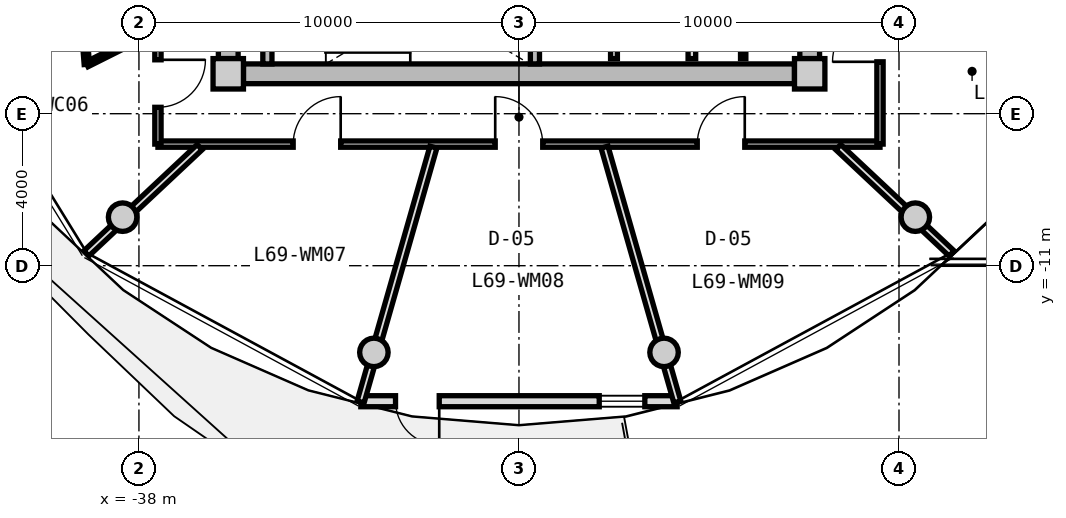
"""IFC4 building model, lengths in metres.
Left out: names, types, materials, properties, quantities, classifications, styles, units other than length and angle.
Written with IfcOpenShell. Run it as: python <this file> out.ifc"""

import sys

from ifc_helpers import new_model, si_unit, direction, frame, frame_2d, origin, origin_2d, place, context, subcontext, project, spatial, rectangle, circle, extrude, source, transform, mapped, element, fill, save


model = new_model("IFC4")
c1 = context("Model", 3, precision=1e-05, world=origin(), true_north=direction((0.0, 1.0)))
c2 = subcontext(c1, "Body", "Model", "MODEL_VIEW")
j1 = project(units=[si_unit("LENGTHUNIT", "METRE"), si_unit("PLANEANGLEUNIT", "RADIAN")], contexts=[c1])
p1 = place(None, origin())
s1 = spatial("IfcSite", under=j1, at=p1, CompositionType="ELEMENT")
p2 = place(p1, origin())
s2 = spatial("IfcBuilding", under=s1, at=p2, CompositionType="ELEMENT")
p3 = place(p2, frame((0.0, 0.0, 223.05)))
s3 = spatial("IfcBuildingStorey", under=s2, at=p3, CompositionType="ELEMENT", Elevation=223.05)
m1 = source(origin(), c2, "Body", "SweptSolid", [
    extrude(rectangle(XDim=0.8, YDim=0.8, at=origin_2d()), origin(), (0.0, 0.0, 1.0), 3.05),
])
for number, where, z_axis, x_axis in (
    (1, (-35.65, -5.95, 0.0), (0.0, 0.0, 1.0), (1.0, 0.0, 0.0)),
    (2, (-20.35, -5.95, 0.0), (0.0, 0.0, 1.0), (1.0, 0.0, 0.0)),
):
    element("IfcColumn", number, at=place(p3, frame(where, z_axis=z_axis, x_axis=x_axis)), inside=s3, PredefinedType="COLUMN", context=c2, shape_type="MappedRepresentation", body=[
        mapped(m1, transform((0.0, 0.0, 0.0), x_axis=(1.0, 0.0, 0.0), y_axis=(0.0, 1.0, 0.0), z_axis=(0.0, 0.0, 1.0), scale=1.0)),
    ])
m2 = source(origin(), c2, "Body", "SweptSolid", [
    extrude(rectangle(XDim=14.5, YDim=0.52, at=frame_2d((7.25, 0.0))), origin(), (0.0, 0.0, 1.0), 2.76),
])
p4 = place(p3, frame((-20.75, -5.95, 0.0), z_axis=(0.0, 0.0, 1.0), x_axis=(-1.0, 0.0, 0.0)))
e3 = element("IfcWall", 3, at=p4, inside=s3, PredefinedType="SHEAR", context=c2, shape_type="MappedRepresentation", body=[
    mapped(m2, transform((0.0, 0.0, 0.0), x_axis=(1.0, 0.0, 0.0), y_axis=(0.0, 1.0, 0.0), z_axis=(0.0, 0.0, 1.0), scale=1.0)),
])
m3 = source(origin(), c2, "Body", "SweptSolid", [
    extrude(rectangle(XDim=11.1, YDim=0.52, at=frame_2d((5.55, 0.0))), origin(), (0.0, 0.0, 1.0), 2.76),
])
p5 = place(p3, frame((-35.65, -5.55, 0.0), z_axis=(0.0, 0.0, 1.0), x_axis=(0.0, 1.0, 0.0)))
e4 = element("IfcWall", 4, at=p5, inside=s3, PredefinedType="SHEAR", context=c2, shape_type="MappedRepresentation", body=[
    mapped(m3, transform((0.0, 0.0, 0.0), x_axis=(1.0, 0.0, 0.0), y_axis=(0.0, 1.0, 0.0), z_axis=(0.0, 0.0, 1.0), scale=1.0)),
])
p6 = place(p5, frame((3.8, 0.0, 0.0)))
e5 = element("IfcOpeningElement", 5, at=p6, cuts=e4, PredefinedType="OPENING", context=c2, shape_type="SweptSolid", body=[
    extrude(rectangle(XDim=1.2, YDim=2.15, at=frame_2d((0.6, 1.075))), frame((0.0, 0.27, 0.0), z_axis=(0.0, -1.0, 0.0), x_axis=(1.0, 0.0, 0.0)), (0.0, 0.0, 1.0), 0.54),
])
p7 = place(p3, frame((-20.35, 5.55, 0.0), z_axis=(0.0, 0.0, 1.0), x_axis=(0.0, -1.0, 0.0)))
e6 = element("IfcWall", 6, at=p7, inside=s3, PredefinedType="SHEAR", context=c2, shape_type="MappedRepresentation", body=[
    mapped(m3, transform((0.0, 0.0, 0.0), x_axis=(1.0, 0.0, 0.0), y_axis=(0.0, 1.0, 0.0), z_axis=(0.0, 0.0, 1.0), scale=1.0)),
])
p8 = place(p7, frame((5.65, 0.0, 0.0)))
e7 = element("IfcOpeningElement", 7, at=p8, cuts=e6, PredefinedType="OPENING", context=c2, shape_type="SweptSolid", body=[
    extrude(rectangle(XDim=1.2, YDim=2.15, at=frame_2d((0.6, 1.075))), frame((0.0, 0.27, 0.0), z_axis=(0.0, -1.0, 0.0), x_axis=(1.0, 0.0, 0.0)), (0.0, 0.0, 1.0), 0.54),
])
m4 = source(origin(), c2, "Body", "SweptSolid", [
    extrude(circle(Radius=0.375, at=origin_2d()), origin(), (0.0, 0.0, 1.0), 3.05),
])
for number, where, z_axis, x_axis in (
    (8, (-38.43, -9.723, 0.0), (0.0, 0.0, 1.0), (1.0, 0.0, 0.0)),
    (9, (-31.818, -13.281, 0.0), (0.0, 0.0, 1.0), (1.0, 0.0, 0.0)),
    (10, (-24.182, -13.281, 0.0), (0.0, 0.0, 1.0), (1.0, 0.0, 0.0)),
    (11, (-17.57, -9.723, 0.0), (0.0, 0.0, 1.0), (1.0, 0.0, 0.0)),
):
    element("IfcColumn", number, at=place(p3, frame(where, z_axis=z_axis, x_axis=x_axis)), inside=s3, PredefinedType="COLUMN", context=c2, shape_type="MappedRepresentation", body=[
        mapped(m4, transform((0.0, 0.0, 0.0), x_axis=(1.0, 0.0, 0.0), y_axis=(0.0, 1.0, 0.0), z_axis=(0.0, 0.0, 1.0), scale=1.0)),
    ])
m5 = source(origin(), c2, "Body", "SweptSolid", [
    extrude(rectangle(XDim=8.324, YDim=0.29, at=frame_2d((4.162, 0.0))), origin(), (0.0, 0.0, 1.0), 2.76),
])
p9 = place(p3, frame((-23.838, -14.566, 0.0), z_axis=(0.0, 0.0, 1.0), x_axis=(-1.0, 0.0, 0.0)))
e12 = element("IfcWall", 12, at=p9, inside=s3, PredefinedType="SOLIDWALL", context=c2, shape_type="MappedRepresentation", body=[
    mapped(m5, transform((0.0, 0.0, 0.0), x_axis=(1.0, 0.0, 0.0), y_axis=(0.0, 1.0, 0.0), z_axis=(0.0, 0.0, 1.0), scale=1.0)),
])
p10 = place(p9, frame((6.26, 0.0, 0.0)))
e13 = element("IfcOpeningElement", 13, at=p10, cuts=e12, PredefinedType="OPENING", context=c2, shape_type="SweptSolid", body=[
    extrude(rectangle(XDim=1.15, YDim=2.25, at=frame_2d((0.575, 1.125))), frame((0.0, 0.155, 0.0), z_axis=(0.0, -1.0, 0.0), x_axis=(1.0, 0.0, 0.0)), (0.0, 0.0, 1.0), 0.31),
])
p11 = place(p9, frame((0.85, 0.0, 0.85)))
e14 = element("IfcOpeningElement", 14, at=p11, cuts=e12, PredefinedType="OPENING", context=c2, shape_type="SweptSolid", body=[
    extrude(rectangle(XDim=1.2, YDim=1.5, at=frame_2d((0.6, 0.75))), frame((0.0, 0.155, 0.0), z_axis=(0.0, -1.0, 0.0), x_axis=(1.0, 0.0, 0.0)), (0.0, 0.0, 1.0), 0.31),
])
m6 = source(origin(), c2, "Body", "SweptSolid", [
    extrude(rectangle(XDim=3.24, YDim=0.24, at=frame_2d((1.62, 0.0))), origin(), (0.0, 0.0, 1.0), 2.76),
])
for number, where, z_axis, x_axis in (
    (15, (-34.62, -5.69, 0.0), (0.0, 0.0, 1.0), (0.0, 1.0, 0.0)),
    (16, (-27.58, -5.69, 0.0), (0.0, 0.0, 1.0), (0.0, 1.0, 0.0)),
):
    element("IfcWall", number, at=place(p3, frame(where, z_axis=z_axis, x_axis=x_axis)), inside=s3, PredefinedType="PARTITIONING", context=c2, shape_type="MappedRepresentation", body=[
        mapped(m6, transform((0.0, 0.0, 0.0), x_axis=(1.0, 0.0, 0.0), y_axis=(0.0, 1.0, 0.0), z_axis=(0.0, 0.0, 1.0), scale=1.0)),
    ])
m7 = source(origin(), c2, "Body", "SweptSolid", [
    extrude(rectangle(XDim=3.8, YDim=0.2, at=frame_2d((1.9, 0.0))), origin(), (0.0, 0.0, 1.0), 2.745),
])
p12 = place(p3, frame((-23.45, -5.55, 0.0), z_axis=(0.0, 0.0, 1.0), x_axis=(0.0, 1.0, 0.0)))
e17 = element("IfcWall", 17, at=p12, inside=s3, PredefinedType="PARTITIONING", context=c2, shape_type="MappedRepresentation", body=[
    mapped(m7, transform((0.0, 0.0, 0.0), x_axis=(1.0, 0.0, 0.0), y_axis=(0.0, 1.0, 0.0), z_axis=(0.0, 0.0, 1.0), scale=1.0)),
])
m8 = source(origin(), c2, "Body", "SweptSolid", [
    extrude(rectangle(XDim=4.2, YDim=0.18, at=frame_2d((2.1, 0.0))), origin(), (0.0, 0.0, 1.0), 2.745),
])
p13 = place(p3, frame((-25.5, -5.55, 0.0), z_axis=(0.0, 0.0, 1.0), x_axis=(0.0, 1.0, 0.0)))
e18 = element("IfcWall", 18, at=p13, inside=s3, PredefinedType="PARTITIONING", context=c2, shape_type="MappedRepresentation", body=[
    mapped(m8, transform((0.0, 0.0, 0.0), x_axis=(1.0, 0.0, 0.0), y_axis=(0.0, 1.0, 0.0), z_axis=(0.0, 0.0, 1.0), scale=1.0)),
])
m9 = source(origin(), c2, "Body", "SweptSolid", [
    extrude(rectangle(XDim=3.8, YDim=0.14, at=frame_2d((1.9, 0.0))), origin(), (0.0, 0.0, 1.0), 2.745),
])
p14 = place(p3, frame((-22.1, -5.55, 0.0), z_axis=(0.0, 0.0, 1.0), x_axis=(0.0, 1.0, 0.0)))
e19 = element("IfcWall", 19, at=p14, inside=s3, PredefinedType="PARTITIONING", context=c2, shape_type="MappedRepresentation", body=[
    mapped(m9, transform((0.0, 0.0, 0.0), x_axis=(1.0, 0.0, 0.0), y_axis=(0.0, 1.0, 0.0), z_axis=(0.0, 0.0, 1.0), scale=1.0)),
])
m10 = source(origin(), c2, "Body", "SweptSolid", [
    extrude(rectangle(XDim=19.0, YDim=0.165, at=frame_2d((9.5, 0.0))), origin(), (0.0, 0.0, 1.0), 2.745),
])
p15 = place(p3, frame((-18.5, -7.8, 0.0), z_axis=(0.0, 0.0, 1.0), x_axis=(-1.0, 0.0, 0.0)))
e20 = element("IfcWall", 20, at=p15, inside=s3, PredefinedType="PARTITIONING", context=c2, shape_type="MappedRepresentation", body=[
    mapped(m10, transform((0.0, 0.0, 0.0), x_axis=(1.0, 0.0, 0.0), y_axis=(0.0, 1.0, 0.0), z_axis=(0.0, 0.0, 1.0), scale=1.0)),
])
p16 = place(p15, frame((14.191, 0.0, 0.0)))
e21 = element("IfcOpeningElement", 21, at=p16, cuts=e20, PredefinedType="OPENING", context=c2, shape_type="SweptSolid", body=[
    extrude(rectangle(XDim=1.25, YDim=2.2, at=frame_2d((0.625, 1.1))), frame((0.0, 0.093, 0.0), z_axis=(0.0, -1.0, 0.0), x_axis=(1.0, 0.0, 0.0)), (0.0, 0.0, 1.0), 0.185),
])
p17 = place(p15, frame((8.875, 0.0, 0.0)))
e22 = element("IfcOpeningElement", 22, at=p17, cuts=e20, PredefinedType="OPENING", context=c2, shape_type="SweptSolid", body=[
    extrude(rectangle(XDim=1.25, YDim=2.2, at=frame_2d((0.625, 1.1))), frame((0.0, 0.093, 0.0), z_axis=(0.0, -1.0, 0.0), x_axis=(1.0, 0.0, 0.0)), (0.0, 0.0, 1.0), 0.185),
])
p18 = place(p15, frame((3.559, 0.0, 0.0)))
e23 = element("IfcOpeningElement", 23, at=p18, cuts=e20, PredefinedType="OPENING", context=c2, shape_type="SweptSolid", body=[
    extrude(rectangle(XDim=1.25, YDim=2.2, at=frame_2d((0.625, 1.1))), frame((0.0, 0.093, 0.0), z_axis=(0.0, -1.0, 0.0), x_axis=(1.0, 0.0, 0.0)), (0.0, 0.0, 1.0), 0.185),
])
m11 = source(origin(), c2, "Body", "SweptSolid", [
    extrude(rectangle(XDim=6.88, YDim=0.165, at=frame_2d((3.44, 0.0))), origin(), (0.0, 0.0, 1.0), 2.745),
])
p19 = place(p3, frame((-37.5, -7.8, 0.0), z_axis=(0.0, 0.0, 1.0), x_axis=(0.0, 1.0, 0.0)))
e24 = element("IfcWall", 24, at=p19, inside=s3, PredefinedType="PARTITIONING", context=c2, shape_type="MappedRepresentation", body=[
    mapped(m11, transform((0.0, 0.0, 0.0), x_axis=(1.0, 0.0, 0.0), y_axis=(0.0, 1.0, 0.0), z_axis=(0.0, 0.0, 1.0), scale=1.0)),
])
p20 = place(p19, frame((0.968, 0.0, 0.0)))
e25 = element("IfcOpeningElement", 25, at=p20, cuts=e24, PredefinedType="OPENING", context=c2, shape_type="SweptSolid", body=[
    extrude(rectangle(XDim=1.25, YDim=2.2, at=frame_2d((0.625, 1.1))), frame((0.0, 0.093, 0.0), z_axis=(0.0, -1.0, 0.0), x_axis=(1.0, 0.0, 0.0)), (0.0, 0.0, 1.0), 0.185),
])
p21 = place(p3, frame((-18.5, -0.92, 0.0), z_axis=(0.0, 0.0, 1.0), x_axis=(0.0, -1.0, 0.0)))
e26 = element("IfcWall", 26, at=p21, inside=s3, PredefinedType="PARTITIONING", context=c2, shape_type="MappedRepresentation", body=[
    mapped(m11, transform((0.0, 0.0, 0.0), x_axis=(1.0, 0.0, 0.0), y_axis=(0.0, 1.0, 0.0), z_axis=(0.0, 0.0, 1.0), scale=1.0)),
])
p22 = place(p21, frame((3.464, 0.0, 0.0)))
e27 = element("IfcOpeningElement", 27, at=p22, cuts=e26, PredefinedType="OPENING", context=c2, shape_type="SweptSolid", body=[
    extrude(rectangle(XDim=1.25, YDim=2.2, at=frame_2d((0.625, 1.1))), frame((0.0, 0.093, 0.0), z_axis=(0.0, -1.0, 0.0), x_axis=(1.0, 0.0, 0.0)), (0.0, 0.0, 1.0), 0.185),
])
m12 = source(origin(), c2, "Body", "SweptSolid", [
    extrude(rectangle(XDim=4.089, YDim=0.19, at=frame_2d((2.044, 0.0))), origin(), (0.0, 0.0, 1.0), 2.345),
])
p23 = place(p3, frame((-36.402, -7.88, 0.0), z_axis=(0.0, 0.0, 1.0), x_axis=(-0.729401273609, -0.684086092577, 0.0)))
e28 = element("IfcWall", 28, at=p23, inside=s3, PredefinedType="PARTITIONING", context=c2, shape_type="MappedRepresentation", body=[
    mapped(m12, transform((0.0, 0.0, 0.0), x_axis=(1.0, 0.0, 0.0), y_axis=(0.0, 1.0, 0.0), z_axis=(0.0, 0.0, 1.0), scale=1.0)),
])
m13 = source(origin(), c2, "Body", "SweptSolid", [
    extrude(rectangle(XDim=2.06, YDim=0.14, at=frame_2d((1.03, 0.0))), origin(), (0.0, 0.0, 1.0), 2.745),
])
p24 = place(p3, frame((-37.53, -4.778, 0.0), z_axis=(0.0, 0.0, 1.0), x_axis=(-0.893952568722, -0.448161583444, 0.0)))
e29 = element("IfcWall", 29, at=p24, inside=s3, PredefinedType="PARTITIONING", context=c2, shape_type="MappedRepresentation", body=[
    mapped(m13, transform((0.0, 0.0, 0.0), x_axis=(1.0, 0.0, 0.0), y_axis=(0.0, 1.0, 0.0), z_axis=(0.0, 0.0, 1.0), scale=1.0)),
])
m14 = source(origin(), c2, "Body", "SweptSolid", [
    extrude(rectangle(XDim=2.798, YDim=0.14, at=frame_2d((1.399, 0.0))), origin(), (0.0, 0.0, 1.0), 2.745),
])
p25 = place(p3, frame((-39.371, -5.701, 0.0), z_axis=(0.0, 0.0, 1.0), x_axis=(-0.077823984089, 0.996967114553, 0.0)))
e30 = element("IfcWall", 30, at=p25, inside=s3, PredefinedType="PARTITIONING", context=c2, shape_type="MappedRepresentation", body=[
    mapped(m14, transform((0.0, 0.0, 0.0), x_axis=(1.0, 0.0, 0.0), y_axis=(0.0, 1.0, 0.0), z_axis=(0.0, 0.0, 1.0), scale=1.0)),
])
p26 = place(p25, frame((0.939, 0.0, 0.0)))
e31 = element("IfcOpeningElement", 31, at=p26, cuts=e30, PredefinedType="OPENING", context=c2, shape_type="SweptSolid", body=[
    extrude(rectangle(XDim=0.92, YDim=2.1, at=frame_2d((0.46, 1.05))), frame((0.0, 0.08, 0.0), z_axis=(0.0, -1.0, 0.0), x_axis=(1.0, 0.0, 0.0)), (0.0, 0.0, 1.0), 0.16),
])
m15 = source(origin(), c2, "Body", "SweptSolid", [
    extrude(rectangle(XDim=6.974, YDim=0.19, at=frame_2d((3.487, 0.0))), origin(), (0.0, 0.0, 1.0), 2.345),
])
for number, where, z_axis, x_axis in (
    (32, (-30.251, -7.88, 0.0), (0.0, 0.0, 1.0), (-0.275, -0.962, 0.0)),
    (33, (-25.749, -7.88, 0.0), (0.0, 0.0, 1.0), (0.275, -0.962, 0.0)),
):
    element("IfcWall", number, at=place(p3, frame(where, z_axis=z_axis, x_axis=x_axis)), inside=s3, PredefinedType="PARTITIONING", context=c2, shape_type="MappedRepresentation", body=[
        mapped(m15, transform((0.0, 0.0, 0.0), x_axis=(1.0, 0.0, 0.0), y_axis=(0.0, 1.0, 0.0), z_axis=(0.0, 0.0, 1.0), scale=1.0)),
    ])
p27 = place(p3, frame((-19.598, -7.88, 0.0), z_axis=(0.0, 0.0, 1.0), x_axis=(0.729401273609, -0.684086092577, 0.0)))
e34 = element("IfcWall", 34, at=p27, inside=s3, PredefinedType="PARTITIONING", context=c2, shape_type="MappedRepresentation", body=[
    mapped(m12, transform((0.0, 0.0, 0.0), x_axis=(1.0, 0.0, 0.0), y_axis=(0.0, 1.0, 0.0), z_axis=(0.0, 0.0, 1.0), scale=1.0)),
])
m16 = source(origin(), c2, "Body", "SweptSolid", [
    extrude(rectangle(XDim=1.15, YDim=2.25, at=frame_2d((0.575, 1.125))), frame((0.0, 0.025, 0.0), z_axis=(0.0, -1.0, 0.0), x_axis=(1.0, 0.0, 0.0)), (0.0, 0.0, 1.0), 0.05),
])
p28 = place(p10, origin())
e35 = element("IfcDoor", 35, at=p28, inside=s3, OperationType="SINGLE_SWING_LEFT", PredefinedType="DOOR", context=c2, shape_type="MappedRepresentation", body=[
    mapped(m16, transform((0.0, 0.0, 0.0), x_axis=(1.0, 0.0, 0.0), y_axis=(0.0, 1.0, 0.0), z_axis=(0.0, 0.0, 1.0), scale=1.0)),
])
fill(e13, e35)
m17 = source(origin(), c2, "Body", "SweptSolid", [
    extrude(rectangle(XDim=1.2, YDim=1.5, at=frame_2d((0.6, 0.75))), frame((0.0, 0.03, 0.0), z_axis=(0.0, -1.0, 0.0), x_axis=(1.0, 0.0, 0.0)), (0.0, 0.0, 1.0), 0.06),
])
p29 = place(p11, origin())
e36 = element("IfcWindow", 36, at=p29, inside=s3, PartitioningType="SINGLE_PANEL", PredefinedType="WINDOW", context=c2, shape_type="MappedRepresentation", body=[
    mapped(m17, transform((0.0, 0.0, 0.0), x_axis=(1.0, 0.0, 0.0), y_axis=(0.0, 1.0, 0.0), z_axis=(0.0, 0.0, 1.0), scale=1.0)),
])
fill(e14, e36)
m18 = source(origin(), c2, "Body", "SweptSolid", [
    extrude(rectangle(XDim=1.25, YDim=2.2, at=frame_2d((0.625, 1.1))), frame((0.0, 0.025, 0.0), z_axis=(0.0, -1.0, 0.0), x_axis=(1.0, 0.0, 0.0)), (0.0, 0.0, 1.0), 0.05),
])
p30 = place(p20, frame((1.25, 0.0, 0.0), z_axis=(0.0, 0.0, 1.0), x_axis=(-1.0, 0.0, 0.0)))
e37 = element("IfcDoor", 37, at=p30, inside=s3, OperationType="SINGLE_SWING_LEFT", PredefinedType="DOOR", context=c2, shape_type="MappedRepresentation", body=[
    mapped(m18, transform((0.0, 0.0, 0.0), x_axis=(1.0, 0.0, 0.0), y_axis=(0.0, 1.0, 0.0), z_axis=(0.0, 0.0, 1.0), scale=1.0)),
])
fill(e25, e37)
p31 = place(p16, frame((1.25, 0.0, 0.0), z_axis=(0.0, 0.0, 1.0), x_axis=(-1.0, 0.0, 0.0)))
e38 = element("IfcDoor", 38, at=p31, inside=s3, OperationType="SINGLE_SWING_RIGHT", PredefinedType="DOOR", context=c2, shape_type="MappedRepresentation", body=[
    mapped(m18, transform((0.0, 0.0, 0.0), x_axis=(1.0, 0.0, 0.0), y_axis=(0.0, 1.0, 0.0), z_axis=(0.0, 0.0, 1.0), scale=1.0)),
])
fill(e21, e38)
p32 = place(p17, frame((1.25, 0.0, 0.0), z_axis=(0.0, 0.0, 1.0), x_axis=(-1.0, 0.0, 0.0)))
e39 = element("IfcDoor", 39, at=p32, inside=s3, OperationType="SINGLE_SWING_LEFT", PredefinedType="DOOR", context=c2, shape_type="MappedRepresentation", body=[
    mapped(m18, transform((0.0, 0.0, 0.0), x_axis=(1.0, 0.0, 0.0), y_axis=(0.0, 1.0, 0.0), z_axis=(0.0, 0.0, 1.0), scale=1.0)),
])
fill(e22, e39)
p33 = place(p18, frame((1.25, 0.0, 0.0), z_axis=(0.0, 0.0, 1.0), x_axis=(-1.0, 0.0, 0.0)))
e40 = element("IfcDoor", 40, at=p33, inside=s3, OperationType="SINGLE_SWING_RIGHT", PredefinedType="DOOR", context=c2, shape_type="MappedRepresentation", body=[
    mapped(m18, transform((0.0, 0.0, 0.0), x_axis=(1.0, 0.0, 0.0), y_axis=(0.0, 1.0, 0.0), z_axis=(0.0, 0.0, 1.0), scale=1.0)),
])
fill(e23, e40)
p34 = place(p22, frame((1.25, 0.0, 0.0), z_axis=(0.0, 0.0, 1.0), x_axis=(-1.0, 0.0, 0.0)))
e41 = element("IfcDoor", 41, at=p34, inside=s3, OperationType="SINGLE_SWING_LEFT", PredefinedType="DOOR", context=c2, shape_type="MappedRepresentation", body=[
    mapped(m18, transform((0.0, 0.0, 0.0), x_axis=(1.0, 0.0, 0.0), y_axis=(0.0, 1.0, 0.0), z_axis=(0.0, 0.0, 1.0), scale=1.0)),
])
fill(e27, e41)
save(model, sys.argv[1])
